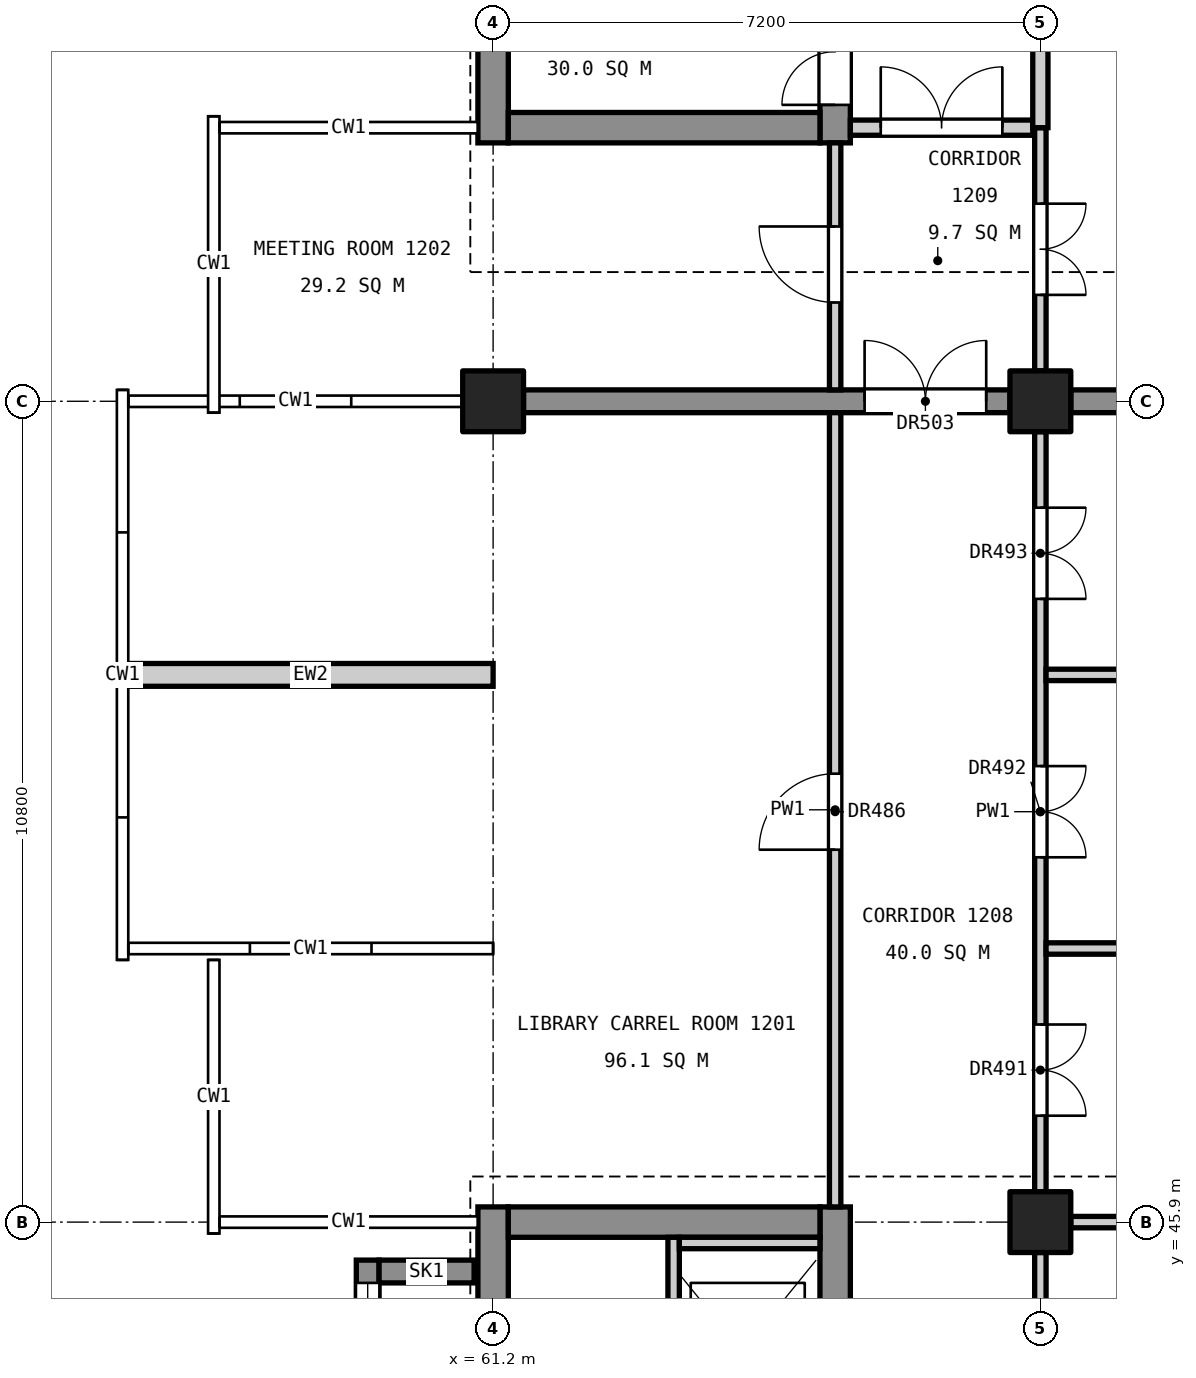
"""IFC4 building model, lengths in metres.
Left out: names, types, materials, properties, quantities, classifications, styles, units other than length and angle.
Written with IfcOpenShell. Run it as: python <this file> out.ifc"""

import sys

from ifc_helpers import new_model, si_unit, direction, frame, frame_2d, origin, origin_2d, place, context, subcontext, project, spatial, rectangle, extrude, element, fill, save


model = new_model("IFC4")
c1 = context("Model", 3, precision=1e-05, world=origin(), true_north=direction((0.0, 1.0)))
c2 = subcontext(c1, "Body", "Model", "MODEL_VIEW")
j1 = project(units=[si_unit("LENGTHUNIT", "METRE"), si_unit("PLANEANGLEUNIT", "RADIAN")], contexts=[c1])
p1 = place(None, origin())
s1 = spatial("IfcSite", under=j1, at=p1, CompositionType="ELEMENT")
p2 = place(p1, origin())
s2 = spatial("IfcBuilding", under=s1, at=p2, CompositionType="ELEMENT")
p3 = place(p2, frame((0.0, 0.0, 60.6)))
s3 = spatial("IfcBuildingStorey", under=s2, at=p3, CompositionType="ELEMENT", Elevation=60.6)
for number, where, z_axis, x_axis in (
    (1, (61.2, 56.7, 0.0), (0.0, 0.0, 1.0), (1.0, 0.0, 0.0)),
    (2, (68.4, 45.9, 0.0), (0.0, 0.0, 1.0), (1.0, 0.0, 0.0)),
    (3, (68.4, 56.7, 0.0), (0.0, 0.0, 1.0), (1.0, 0.0, 0.0)),
):
    element("IfcColumn", number, at=place(p3, frame(where, z_axis=z_axis, x_axis=x_axis)), inside=s3, PredefinedType="COLUMN", context=c2, shape_type="SweptSolid", body=[
        extrude(rectangle(XDim=0.8, YDim=0.8, at=origin_2d()), origin(), (0.0, 0.0, 1.0), 4.8),
    ])
p4 = place(p3, frame((61.2, 34.9, 0.0), z_axis=(0.0, 0.0, 1.0), x_axis=(0.0, 1.0, 0.0)))
e4 = element("IfcWall", 4, at=p4, inside=s3, PredefinedType="SHEAR", context=c2, shape_type="SweptSolid", body=[
    extrude(rectangle(XDim=11.2, YDim=0.4, at=frame_2d((5.6, 0.0))), origin(), (0.0, 0.0, 1.0), 4.55),
])
p5 = place(p4, frame((6.11, 0.0, 3.4)))
e5 = element("IfcOpeningElement", 5, at=p5, cuts=e4, PredefinedType="OPENING", context=c2, shape_type="SweptSolid", body=[
    extrude(rectangle(XDim=1.2, YDim=0.9, at=frame_2d((0.6, 0.45))), frame((0.0, 0.21, 0.0), z_axis=(0.0, -1.0, 0.0), x_axis=(1.0, 0.0, 0.0)), (0.0, 0.0, 1.0), 0.42),
])
p6 = place(p3, frame((65.7, 34.9, 0.0), z_axis=(0.0, 0.0, 1.0), x_axis=(0.0, 1.0, 0.0)))
e6 = element("IfcWall", 6, at=p6, inside=s3, PredefinedType="SHEAR", context=c2, shape_type="SweptSolid", body=[
    extrude(rectangle(XDim=11.2, YDim=0.4, at=frame_2d((5.6, 0.0))), origin(), (0.0, 0.0, 1.0), 4.55),
])
p7 = place(p6, frame((0.5, 0.0, 0.0)))
e7 = element("IfcOpeningElement", 7, at=p7, cuts=e6, PredefinedType="OPENING", context=c2, shape_type="SweptSolid", body=[
    extrude(rectangle(XDim=1.4, YDim=2.1, at=frame_2d((0.7, 1.05))), frame((0.0, 0.21, 0.0), z_axis=(0.0, -1.0, 0.0), x_axis=(1.0, 0.0, 0.0)), (0.0, 0.0, 1.0), 0.42),
])
p8 = place(p6, frame((8.75, 0.0, 0.0)))
e8 = element("IfcOpeningElement", 8, at=p8, cuts=e6, PredefinedType="OPENING", context=c2, shape_type="SweptSolid", body=[
    extrude(rectangle(XDim=1.1, YDim=2.1, at=frame_2d((0.55, 1.05))), frame((0.0, 0.21, 0.0), z_axis=(0.0, -1.0, 0.0), x_axis=(1.0, 0.0, 0.0)), (0.0, 0.0, 1.0), 0.42),
])
p9 = place(p3, frame((61.4, 45.9, 0.0), z_axis=(0.0, 0.0, 1.0), x_axis=(1.0, 0.0, 0.0)))
e9 = element("IfcWall", 9, at=p9, inside=s3, PredefinedType="SHEAR", context=c2, shape_type="SweptSolid", body=[
    extrude(rectangle(XDim=4.1, YDim=0.4, at=frame_2d((2.05, 0.0))), origin(), (0.0, 0.0, 1.0), 4.55),
])
p10 = place(p3, frame((61.2, 60.1, 0.0), z_axis=(0.0, 0.0, 1.0), x_axis=(0.0, 1.0, 0.0)))
e10 = element("IfcWall", 10, at=p10, inside=s3, PredefinedType="SHEAR", context=c2, shape_type="SweptSolid", body=[
    extrude(rectangle(XDim=14.8, YDim=0.4, at=frame_2d((7.4, 0.0))), origin(), (0.0, 0.0, 1.0), 4.55),
])
p11 = place(p10, frame((6.11, 0.0, 3.4)))
e11 = element("IfcOpeningElement", 11, at=p11, cuts=e10, PredefinedType="OPENING", context=c2, shape_type="SweptSolid", body=[
    extrude(rectangle(XDim=1.2, YDim=0.9, at=frame_2d((0.6, 0.45))), frame((0.0, 0.21, 0.0), z_axis=(0.0, -1.0, 0.0), x_axis=(1.0, 0.0, 0.0)), (0.0, 0.0, 1.0), 0.42),
])
p12 = place(p3, frame((65.7, 60.1, 0.0), z_axis=(0.0, 0.0, 1.0), x_axis=(0.0, 1.0, 0.0)))
e12 = element("IfcWall", 12, at=p12, inside=s3, PredefinedType="SHEAR", context=c2, shape_type="SweptSolid", body=[
    extrude(rectangle(XDim=14.8, YDim=0.4, at=frame_2d((7.4, 0.0))), origin(), (0.0, 0.0, 1.0), 4.55),
])
p13 = place(p12, frame((0.5, 0.0, 0.0)))
e13 = element("IfcOpeningElement", 13, at=p13, cuts=e12, PredefinedType="OPENING", context=c2, shape_type="SweptSolid", body=[
    extrude(rectangle(XDim=1.4, YDim=2.1, at=frame_2d((0.7, 1.05))), frame((0.0, 0.21, 0.0), z_axis=(0.0, -1.0, 0.0), x_axis=(1.0, 0.0, 0.0)), (0.0, 0.0, 1.0), 0.42),
])
p14 = place(p12, frame((8.8, 0.0, 0.0)))
e14 = element("IfcOpeningElement", 14, at=p14, cuts=e12, PredefinedType="OPENING", context=c2, shape_type="SweptSolid", body=[
    extrude(rectangle(XDim=1.1, YDim=2.1, at=frame_2d((0.55, 1.05))), frame((0.0, 0.21, 0.0), z_axis=(0.0, -1.0, 0.0), x_axis=(1.0, 0.0, 0.0)), (0.0, 0.0, 1.0), 0.42),
])
p15 = place(p12, frame((11.35, 0.0, 0.0)))
e15 = element("IfcOpeningElement", 15, at=p15, cuts=e12, PredefinedType="OPENING", context=c2, shape_type="SweptSolid", body=[
    extrude(rectangle(XDim=1.1, YDim=2.1, at=frame_2d((0.55, 1.05))), frame((0.0, 0.21, 0.0), z_axis=(0.0, -1.0, 0.0), x_axis=(1.0, 0.0, 0.0)), (0.0, 0.0, 1.0), 0.42),
])
p16 = place(p3, frame((61.4, 60.3, 0.0), z_axis=(0.0, 0.0, 1.0), x_axis=(1.0, 0.0, 0.0)))
e16 = element("IfcWall", 16, at=p16, inside=s3, PredefinedType="SHEAR", context=c2, shape_type="SweptSolid", body=[
    extrude(rectangle(XDim=4.1, YDim=0.4, at=frame_2d((2.05, 0.0))), origin(), (0.0, 0.0, 1.0), 4.55),
])
p17 = place(p3, frame((59.55, 43.0, 0.0), z_axis=(0.0, 0.0, 1.0), x_axis=(0.0, 1.0, 0.0)))
e17 = element("IfcWall", 17, at=p17, inside=s3, PredefinedType="SHEAR", context=c2, shape_type="SweptSolid", body=[
    extrude(rectangle(XDim=2.4, YDim=0.3, at=frame_2d((1.2, 0.0))), origin(), (0.0, 0.0, 1.0), 4.8),
])
p18 = place(p17, frame((0.3, 0.0, 3.0)))
e18 = element("IfcOpeningElement", 18, at=p18, cuts=e17, PredefinedType="OPENING", context=c2, shape_type="SweptSolid", body=[
    extrude(rectangle(XDim=1.8, YDim=1.2, at=frame_2d((0.9, 0.6))), frame((0.0, 0.16, 0.0), z_axis=(0.0, -1.0, 0.0), x_axis=(1.0, 0.0, 0.0)), (0.0, 0.0, 1.0), 0.32),
])
p19 = place(p3, frame((60.95, 45.25, 0.0), z_axis=(0.0, 0.0, 1.0), x_axis=(-1.0, 0.0, 0.0)))
e19 = element("IfcWall", 19, at=p19, inside=s3, PredefinedType="SHEAR", context=c2, shape_type="SweptSolid", body=[
    extrude(rectangle(XDim=1.25, YDim=0.3, at=frame_2d((0.625, 0.0))), origin(), (0.0, 0.0, 1.0), 4.8),
])
p20 = place(p3, frame((61.6, 56.7, 0.0), z_axis=(0.0, 0.0, 1.0), x_axis=(1.0, 0.0, 0.0)))
e20 = element("IfcWall", 20, at=p20, inside=s3, PredefinedType="SHEAR", context=c2, shape_type="SweptSolid", body=[
    extrude(rectangle(XDim=6.4, YDim=0.3, at=frame_2d((3.2, 0.0))), origin(), (0.0, 0.0, 1.0), 4.55),
])
p21 = place(p20, frame((4.488, 0.0, 0.0)))
e21 = element("IfcOpeningElement", 21, at=p21, cuts=e20, PredefinedType="OPENING", context=c2, shape_type="SweptSolid", body=[
    extrude(rectangle(XDim=1.6, YDim=2.1, at=frame_2d((0.8, 1.05))), frame((0.0, 0.16, 0.0), z_axis=(0.0, -1.0, 0.0), x_axis=(1.0, 0.0, 0.0)), (0.0, 0.0, 1.0), 0.32),
])
p22 = place(p3, frame((68.8, 56.7, 0.0), z_axis=(0.0, 0.0, 1.0), x_axis=(1.0, 0.0, 0.0)))
e22 = element("IfcWall", 22, at=p22, inside=s3, PredefinedType="SHEAR", context=c2, shape_type="SweptSolid", body=[
    extrude(rectangle(XDim=10.0, YDim=0.3, at=frame_2d((5.0, 0.0))), origin(), (0.0, 0.0, 1.0), 4.55),
])
p23 = place(p3, frame((63.575, 43.0, 0.0), z_axis=(0.0, 0.0, 1.0), x_axis=(0.0, 1.0, 0.0)))
e23 = element("IfcWall", 23, at=p23, inside=s3, PredefinedType="SOLIDWALL", context=c2, shape_type="SweptSolid", body=[
    extrude(rectangle(XDim=2.7, YDim=0.15, at=frame_2d((1.35, 0.0))), origin(), (0.0, 0.0, 1.0), 4.8),
])
p24 = place(p3, frame((63.65, 45.625, 0.0), z_axis=(0.0, 0.0, 1.0), x_axis=(1.0, 0.0, 0.0)))
e24 = element("IfcWall", 24, at=p24, inside=s3, PredefinedType="SOLIDWALL", context=c2, shape_type="SweptSolid", body=[
    extrude(rectangle(XDim=1.85, YDim=0.15, at=frame_2d((0.925, 0.0))), origin(), (0.0, 0.0, 1.0), 4.8),
])
p25 = place(p3, frame((56.4, 53.1, 0.0), z_axis=(0.0, 0.0, 1.0), x_axis=(1.0, 0.0, 0.0)))
e25 = element("IfcWall", 25, at=p25, inside=s3, PredefinedType="STANDARD", context=c2, shape_type="SweptSolid", body=[
    extrude(rectangle(XDim=4.8, YDim=0.3, at=frame_2d((2.4, 0.0))), origin(), (0.0, 0.0, 1.0), 3.65),
])
p26 = place(p3, frame((65.7, 46.1, 0.0), z_axis=(0.0, 0.0, 1.0), x_axis=(0.0, 1.0, 0.0)))
e26 = element("IfcWall", 26, at=p26, inside=s3, PredefinedType="PARTITIONING", context=c2, shape_type="SweptSolid", body=[
    extrude(rectangle(XDim=10.45, YDim=0.15, at=frame_2d((5.225, 0.0))), origin(), (0.0, 0.0, 1.0), 3.55),
])
p27 = place(p26, frame((4.7, 0.0, 0.0)))
e27 = element("IfcOpeningElement", 27, at=p27, cuts=e26, PredefinedType="OPENING", context=c2, shape_type="SweptSolid", body=[
    extrude(rectangle(XDim=1.0, YDim=2.1, at=frame_2d((0.5, 1.05))), frame((0.0, 0.085, 0.0), z_axis=(0.0, -1.0, 0.0), x_axis=(1.0, 0.0, 0.0)), (0.0, 0.0, 1.0), 0.17),
])
p28 = place(p3, frame((65.7, 56.85, 0.0), z_axis=(0.0, 0.0, 1.0), x_axis=(0.0, 1.0, 0.0)))
e28 = element("IfcWall", 28, at=p28, inside=s3, PredefinedType="PARTITIONING", context=c2, shape_type="SweptSolid", body=[
    extrude(rectangle(XDim=3.25, YDim=0.15, at=frame_2d((1.625, 0.0))), origin(), (0.0, 0.0, 1.0), 3.55),
])
p29 = place(p28, frame((1.15, 0.0, 0.0)))
e29 = element("IfcOpeningElement", 29, at=p29, cuts=e28, PredefinedType="OPENING", context=c2, shape_type="SweptSolid", body=[
    extrude(rectangle(XDim=1.0, YDim=2.1, at=frame_2d((0.5, 1.05))), frame((0.0, 0.085, 0.0), z_axis=(0.0, -1.0, 0.0), x_axis=(1.0, 0.0, 0.0)), (0.0, 0.0, 1.0), 0.17),
])
p30 = place(p3, frame((65.9, 60.3, 0.0), z_axis=(0.0, 0.0, 1.0), x_axis=(1.0, 0.0, 0.0)))
e30 = element("IfcWall", 30, at=p30, inside=s3, PredefinedType="PARTITIONING", context=c2, shape_type="SweptSolid", body=[
    extrude(rectangle(XDim=2.4, YDim=0.2, at=frame_2d((1.2, 0.0))), origin(), (0.0, 0.0, 1.0), 3.85),
])
p31 = place(p30, frame((0.4, 0.0, 0.0)))
e31 = element("IfcOpeningElement", 31, at=p31, cuts=e30, PredefinedType="OPENING", context=c2, shape_type="SweptSolid", body=[
    extrude(rectangle(XDim=1.6, YDim=2.1, at=frame_2d((0.8, 1.05))), frame((0.0, 0.11, 0.0), z_axis=(0.0, -1.0, 0.0), x_axis=(1.0, 0.0, 0.0)), (0.0, 0.0, 1.0), 0.22),
])
p32 = place(p3, frame((68.4, 41.9, 0.0), z_axis=(0.0, 0.0, 1.0), x_axis=(0.0, 1.0, 0.0)))
e32 = element("IfcWall", 32, at=p32, inside=s3, PredefinedType="PARTITIONING", context=c2, shape_type="SweptSolid", body=[
    extrude(rectangle(XDim=3.6, YDim=0.15, at=frame_2d((1.8, 0.0))), origin(), (0.0, 0.0, 1.0), 3.55),
])
p33 = place(p32, frame((1.2, 0.0, 0.0)))
e33 = element("IfcOpeningElement", 33, at=p33, cuts=e32, PredefinedType="OPENING", context=c2, shape_type="SweptSolid", body=[
    extrude(rectangle(XDim=1.2, YDim=2.1, at=frame_2d((0.6, 1.05))), frame((0.0, 0.085, 0.0), z_axis=(0.0, -1.0, 0.0), x_axis=(1.0, 0.0, 0.0)), (0.0, 0.0, 1.0), 0.17),
])
p34 = place(p3, frame((68.4, 46.3, 0.0), z_axis=(0.0, 0.0, 1.0), x_axis=(0.0, 1.0, 0.0)))
e34 = element("IfcWall", 34, at=p34, inside=s3, PredefinedType="PARTITIONING", context=c2, shape_type="SweptSolid", body=[
    extrude(rectangle(XDim=10.0, YDim=0.15, at=frame_2d((5.0, 0.0))), origin(), (0.0, 0.0, 1.0), 3.55),
])
p35 = place(p34, frame((1.0, 0.0, 0.0)))
e35 = element("IfcOpeningElement", 35, at=p35, cuts=e34, PredefinedType="OPENING", context=c2, shape_type="SweptSolid", body=[
    extrude(rectangle(XDim=1.2, YDim=2.1, at=frame_2d((0.6, 1.05))), frame((0.0, 0.085, 0.0), z_axis=(0.0, -1.0, 0.0), x_axis=(1.0, 0.0, 0.0)), (0.0, 0.0, 1.0), 0.17),
])
p36 = place(p34, frame((4.4, 0.0, 0.0)))
e36 = element("IfcOpeningElement", 36, at=p36, cuts=e34, PredefinedType="OPENING", context=c2, shape_type="SweptSolid", body=[
    extrude(rectangle(XDim=1.2, YDim=2.1, at=frame_2d((0.6, 1.05))), frame((0.0, 0.085, 0.0), z_axis=(0.0, -1.0, 0.0), x_axis=(1.0, 0.0, 0.0)), (0.0, 0.0, 1.0), 0.17),
])
p37 = place(p34, frame((7.8, 0.0, 0.0)))
e37 = element("IfcOpeningElement", 37, at=p37, cuts=e34, PredefinedType="OPENING", context=c2, shape_type="SweptSolid", body=[
    extrude(rectangle(XDim=1.2, YDim=2.1, at=frame_2d((0.6, 1.05))), frame((0.0, 0.085, 0.0), z_axis=(0.0, -1.0, 0.0), x_axis=(1.0, 0.0, 0.0)), (0.0, 0.0, 1.0), 0.17),
])
p38 = place(p3, frame((68.4, 57.1, 0.0), z_axis=(0.0, 0.0, 1.0), x_axis=(0.0, 1.0, 0.0)))
e38 = element("IfcWall", 38, at=p38, inside=s3, PredefinedType="PARTITIONING", context=c2, shape_type="SweptSolid", body=[
    extrude(rectangle(XDim=3.2, YDim=0.15, at=frame_2d((1.6, 0.0))), origin(), (0.0, 0.0, 1.0), 3.55),
])
p39 = place(p38, frame((1.0, 0.0, 0.0)))
e39 = element("IfcOpeningElement", 39, at=p39, cuts=e38, PredefinedType="OPENING", context=c2, shape_type="SweptSolid", body=[
    extrude(rectangle(XDim=1.2, YDim=2.1, at=frame_2d((0.6, 1.05))), frame((0.0, 0.085, 0.0), z_axis=(0.0, -1.0, 0.0), x_axis=(1.0, 0.0, 0.0)), (0.0, 0.0, 1.0), 0.17),
])
p40 = place(p3, frame((68.4, 60.3, 0.0), z_axis=(0.0, 0.0, 1.0), x_axis=(0.0, 1.0, 0.0)))
e40 = element("IfcWall", 40, at=p40, inside=s3, PredefinedType="PARTITIONING", context=c2, shape_type="SweptSolid", body=[
    extrude(rectangle(XDim=4.2, YDim=0.2, at=frame_2d((2.1, 0.0))), origin(), (0.0, 0.0, 1.0), 3.55),
])
p41 = place(p3, frame((68.8, 45.9, 0.0), z_axis=(0.0, 0.0, 1.0), x_axis=(1.0, 0.0, 0.0)))
e41 = element("IfcWall", 41, at=p41, inside=s3, PredefinedType="PARTITIONING", context=c2, shape_type="SweptSolid", body=[
    extrude(rectangle(XDim=10.0, YDim=0.15, at=frame_2d((5.0, 0.0))), origin(), (0.0, 0.0, 1.0), 3.85),
])
for number, where, z_axis, x_axis in (
    (42, (68.475, 49.5, 0.0), (0.0, 0.0, 1.0), (1.0, 0.0, 0.0)),
    (43, (68.475, 53.1, 0.0), (0.0, 0.0, 1.0), (1.0, 0.0, 0.0)),
):
    element("IfcWall", number, at=place(p3, frame(where, z_axis=z_axis, x_axis=x_axis)), inside=s3, PredefinedType="PARTITIONING", context=c2, shape_type="SweptSolid", body=[
        extrude(rectangle(XDim=10.575, YDim=0.15, at=frame_2d((5.288, 0.0))), origin(), (0.0, 0.0, 1.0), 3.85),
    ])
p42 = place(p13, origin())
e44 = element("IfcDoor", 44, at=p42, inside=s3, OperationType="DOUBLE_DOOR_SINGLE_SWING", PredefinedType="DOOR", context=c2, shape_type="SweptSolid", body=[
    extrude(rectangle(XDim=1.4, YDim=2.1, at=frame_2d((0.7, 1.05))), frame((0.0, 0.025, 0.0), z_axis=(0.0, -1.0, 0.0), x_axis=(1.0, 0.0, 0.0)), (0.0, 0.0, 1.0), 0.05),
])
fill(e13, e44)
p43 = place(p18, origin())
e45 = element("IfcWindow", 45, at=p43, inside=s3, PartitioningType="SINGLE_PANEL", PredefinedType="WINDOW", context=c2, shape_type="SweptSolid", body=[
    extrude(rectangle(XDim=1.8, YDim=1.2, at=frame_2d((0.9, 0.6))), frame((0.0, 0.03, 0.0), z_axis=(0.0, -1.0, 0.0), x_axis=(1.0, 0.0, 0.0)), (0.0, 0.0, 1.0), 0.06),
])
fill(e18, e45)
p44 = place(p27, origin())
e46 = element("IfcDoor", 46, at=p44, inside=s3, OperationType="SINGLE_SWING_LEFT", PredefinedType="DOOR", context=c2, shape_type="SweptSolid", body=[
    extrude(rectangle(XDim=1.0, YDim=2.1, at=frame_2d((0.5, 1.05))), frame((0.0, 0.025, 0.0), z_axis=(0.0, -1.0, 0.0), x_axis=(1.0, 0.0, 0.0)), (0.0, 0.0, 1.0), 0.05),
])
fill(e27, e46)
p45 = place(p29, origin())
e47 = element("IfcDoor", 47, at=p45, inside=s3, OperationType="SINGLE_SWING_RIGHT", PredefinedType="DOOR", context=c2, shape_type="SweptSolid", body=[
    extrude(rectangle(XDim=1.0, YDim=2.1, at=frame_2d((0.5, 1.05))), frame((0.0, 0.025, 0.0), z_axis=(0.0, -1.0, 0.0), x_axis=(1.0, 0.0, 0.0)), (0.0, 0.0, 1.0), 0.05),
])
fill(e29, e47)
p46 = place(p35, frame((1.2, 0.0, 0.0), z_axis=(0.0, 0.0, 1.0), x_axis=(-1.0, 0.0, 0.0)))
e48 = element("IfcDoor", 48, at=p46, inside=s3, OperationType="DOUBLE_DOOR_SINGLE_SWING", PredefinedType="DOOR", context=c2, shape_type="SweptSolid", body=[
    extrude(rectangle(XDim=1.2, YDim=2.1, at=frame_2d((0.6, 1.05))), frame((0.0, 0.025, 0.0), z_axis=(0.0, -1.0, 0.0), x_axis=(1.0, 0.0, 0.0)), (0.0, 0.0, 1.0), 0.05),
])
fill(e35, e48)
p47 = place(p36, frame((1.2, 0.0, 0.0), z_axis=(0.0, 0.0, 1.0), x_axis=(-1.0, 0.0, 0.0)))
e49 = element("IfcDoor", 49, at=p47, inside=s3, OperationType="DOUBLE_DOOR_SINGLE_SWING", PredefinedType="DOOR", context=c2, shape_type="SweptSolid", body=[
    extrude(rectangle(XDim=1.2, YDim=2.1, at=frame_2d((0.6, 1.05))), frame((0.0, 0.025, 0.0), z_axis=(0.0, -1.0, 0.0), x_axis=(1.0, 0.0, 0.0)), (0.0, 0.0, 1.0), 0.05),
])
fill(e36, e49)
p48 = place(p37, frame((1.2, 0.0, 0.0), z_axis=(0.0, 0.0, 1.0), x_axis=(-1.0, 0.0, 0.0)))
e50 = element("IfcDoor", 50, at=p48, inside=s3, OperationType="DOUBLE_DOOR_SINGLE_SWING", PredefinedType="DOOR", context=c2, shape_type="SweptSolid", body=[
    extrude(rectangle(XDim=1.2, YDim=2.1, at=frame_2d((0.6, 1.05))), frame((0.0, 0.025, 0.0), z_axis=(0.0, -1.0, 0.0), x_axis=(1.0, 0.0, 0.0)), (0.0, 0.0, 1.0), 0.05),
])
fill(e37, e50)
p49 = place(p39, frame((1.2, 0.0, 0.0), z_axis=(0.0, 0.0, 1.0), x_axis=(-1.0, 0.0, 0.0)))
e51 = element("IfcDoor", 51, at=p49, inside=s3, OperationType="DOUBLE_DOOR_SINGLE_SWING", PredefinedType="DOOR", context=c2, shape_type="SweptSolid", body=[
    extrude(rectangle(XDim=1.2, YDim=2.1, at=frame_2d((0.6, 1.05))), frame((0.0, 0.025, 0.0), z_axis=(0.0, -1.0, 0.0), x_axis=(1.0, 0.0, 0.0)), (0.0, 0.0, 1.0), 0.05),
])
fill(e39, e51)
p50 = place(p31, origin())
e52 = element("IfcDoor", 52, at=p50, inside=s3, OperationType="DOUBLE_DOOR_SINGLE_SWING", PredefinedType="DOOR", context=c2, shape_type="SweptSolid", body=[
    extrude(rectangle(XDim=1.6, YDim=2.1, at=frame_2d((0.8, 1.05))), frame((0.0, 0.025, 0.0), z_axis=(0.0, -1.0, 0.0), x_axis=(1.0, 0.0, 0.0)), (0.0, 0.0, 1.0), 0.05),
])
fill(e31, e52)
p51 = place(p21, origin())
e53 = element("IfcDoor", 53, at=p51, inside=s3, OperationType="DOUBLE_DOOR_SINGLE_SWING", PredefinedType="DOOR", context=c2, shape_type="SweptSolid", body=[
    extrude(rectangle(XDim=1.6, YDim=2.1, at=frame_2d((0.8, 1.05))), frame((0.0, 0.025, 0.0), z_axis=(0.0, -1.0, 0.0), x_axis=(1.0, 0.0, 0.0)), (0.0, 0.0, 1.0), 0.05),
])
fill(e21, e53)
save(model, sys.argv[1])
